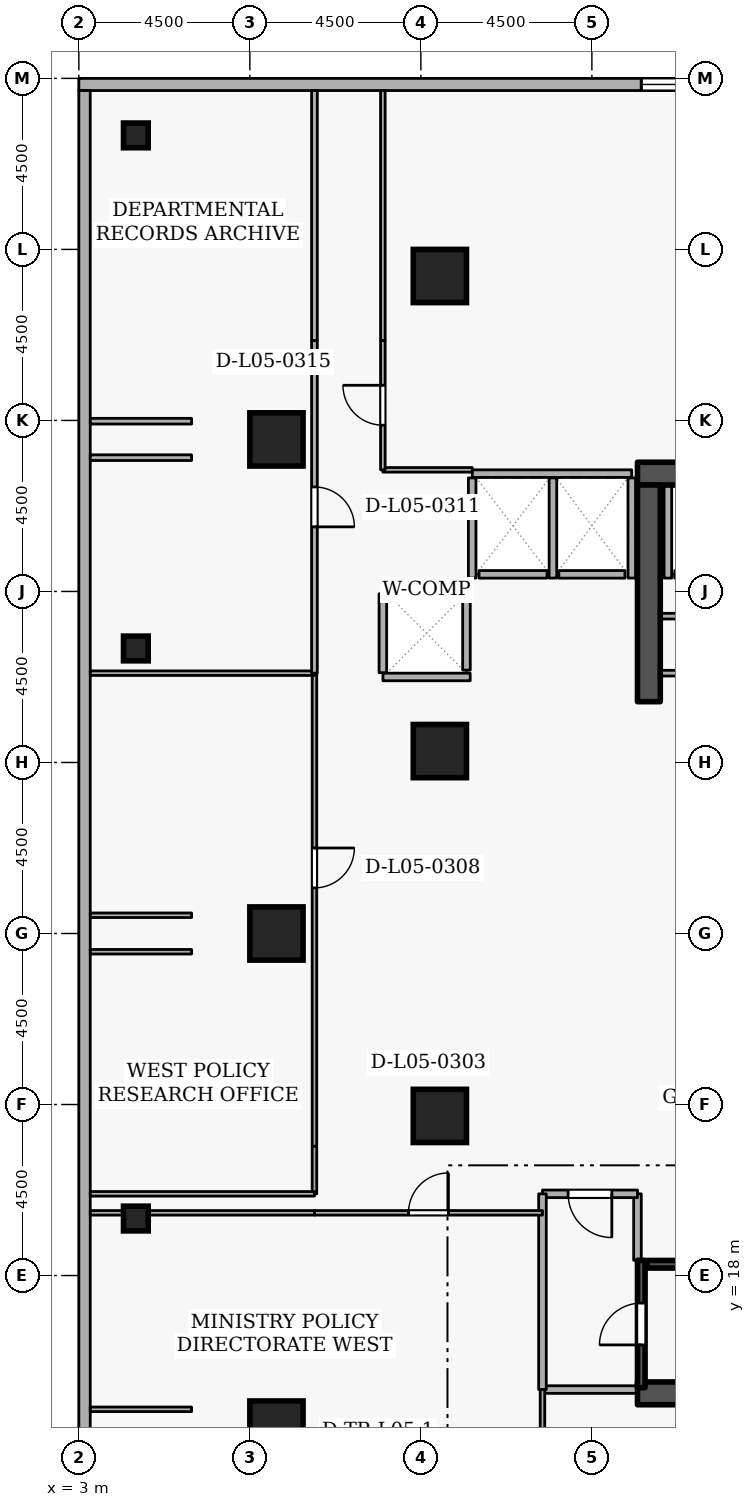
"""IFC4 building model, lengths in metres.
Left out: names, types, materials, properties, quantities, classifications, styles, units other than length and angle.
Written with IfcOpenShell. Run it as: python <this file> out.ifc"""

import sys

from ifc_helpers import new_model, si_unit, direction, frame, frame_2d, origin, origin_2d, place, context, subcontext, project, spatial, rectangle, extrude, element, fill, save


model = new_model("IFC4")
c1 = context("Model", 3, precision=1e-05, world=origin(), true_north=direction((0.0, 1.0)))
c2 = subcontext(c1, "Body", "Model", "MODEL_VIEW")
j1 = project(units=[si_unit("LENGTHUNIT", "METRE"), si_unit("PLANEANGLEUNIT", "RADIAN")], contexts=[c1])
p1 = place(None, origin())
s1 = spatial("IfcSite", under=j1, at=p1, CompositionType="ELEMENT")
p2 = place(p1, origin())
s2 = spatial("IfcBuilding", under=s1, at=p2, CompositionType="ELEMENT")
p3 = place(p2, frame((0.0, 0.0, 23.1)))
s3 = spatial("IfcBuildingStorey", under=s2, at=p3, CompositionType="ELEMENT", Elevation=23.1)
for number, where, z_axis, x_axis in (
    (1, (17.7, 14.9, 0.0), (0.0, 0.0, 1.0), (1.0, 0.0, 0.0)),
    (2, (17.7, 39.1, 0.0), (0.0, 0.0, 1.0), (1.0, 0.0, 0.0)),
):
    element("IfcWall", number, at=place(p3, frame(where, z_axis=z_axis, x_axis=x_axis)), inside=s3, PredefinedType="SHEAR", context=c2, shape_type="SweptSolid", body=[
        extrude(rectangle(XDim=15.6, YDim=0.6, at=frame_2d((7.8, 0.0))), origin(), (0.0, 0.0, 1.0), 4.8),
    ])
p4 = place(p3, frame((18.0, 33.1, 0.0), z_axis=(0.0, 0.0, 1.0), x_axis=(0.0, 1.0, 0.0)))
e3 = element("IfcWall", 3, at=p4, inside=s3, PredefinedType="SHEAR", context=c2, shape_type="SweptSolid", body=[
    extrude(rectangle(XDim=5.7, YDim=0.6, at=frame_2d((2.85, 0.0))), origin(), (0.0, 0.0, 1.0), 4.8),
])
for number, where, z_axis, x_axis in (
    (4, (12.5, 44.3, 0.0), (0.0, 0.0, 1.0), (1.0, 0.0, 0.0)),
    (5, (8.2, 14.0, 0.0), (0.0, 0.0, 1.0), (1.0, 0.0, 0.0)),
    (6, (8.2, 27.0, 0.0), (0.0, 0.0, 1.0), (1.0, 0.0, 0.0)),
    (7, (8.2, 40.0, 0.0), (0.0, 0.0, 1.0), (1.0, 0.0, 0.0)),
    (8, (12.5, 22.2, 0.0), (0.0, 0.0, 1.0), (1.0, 0.0, 0.0)),
    (9, (12.5, 31.8, 0.0), (0.0, 0.0, 1.0), (1.0, 0.0, 0.0)),
):
    element("IfcColumn", number, at=place(p3, frame(where, z_axis=z_axis, x_axis=x_axis)), inside=s3, PredefinedType="COLUMN", context=c2, shape_type="SweptSolid", body=[
        extrude(rectangle(XDim=1.4, YDim=1.4, at=origin_2d()), origin(), (0.0, 0.0, 1.0), 4.8),
    ])
for number, where, z_axis, x_axis in (
    (10, (4.5, 19.5, 0.0), (0.0, 0.0, 1.0), (1.0, 0.0, 0.0)),
    (11, (4.5, 34.5, 0.0), (0.0, 0.0, 1.0), (1.0, 0.0, 0.0)),
    (12, (4.5, 48.0, 0.0), (0.0, 0.0, 1.0), (1.0, 0.0, 0.0)),
):
    element("IfcColumn", number, at=place(p3, frame(where, z_axis=z_axis, x_axis=x_axis)), inside=s3, PredefinedType="COLUMN", context=c2, shape_type="SweptSolid", body=[
        extrude(rectangle(XDim=0.65, YDim=0.65, at=origin_2d()), origin(), (0.0, 0.0, 1.0), 4.8),
    ])
p5 = place(p3, frame((42.4, 49.34, 0.0), z_axis=(0.0, 0.0, 1.0), x_axis=(-1.0, 0.0, 0.0)))
e13 = element("IfcWall", 13, at=p5, inside=s3, PredefinedType="STANDARD", context=c2, shape_type="SweptSolid", body=[
    extrude(rectangle(XDim=39.4, YDim=0.32, at=frame_2d((19.7, 0.0))), origin(), (0.0, 0.0, 1.0), 2.84),
])
p6 = place(p5, frame((12.8, 0.0, 0.65)))
e14 = element("IfcOpeningElement", 14, at=p6, cuts=e13, PredefinedType="OPENING", context=c2, shape_type="SweptSolid", body=[
    extrude(rectangle(XDim=1.8, YDim=1.25, at=frame_2d((0.9, 0.625))), frame((0.0, 0.17, 0.0), z_axis=(0.0, -1.0, 0.0), x_axis=(1.0, 0.0, 0.0)), (0.0, 0.0, 1.0), 0.34),
])
p7 = place(p5, frame((22.8, 0.0, 0.65)))
e15 = element("IfcOpeningElement", 15, at=p7, cuts=e13, PredefinedType="OPENING", context=c2, shape_type="SweptSolid", body=[
    extrude(rectangle(XDim=1.8, YDim=1.25, at=frame_2d((0.9, 0.625))), frame((0.0, 0.17, 0.0), z_axis=(0.0, -1.0, 0.0), x_axis=(1.0, 0.0, 0.0)), (0.0, 0.0, 1.0), 0.34),
])
p8 = place(p3, frame((3.15, 49.18, 0.0), z_axis=(0.0, 0.0, 1.0), x_axis=(0.0, -1.0, 0.0)))
e16 = element("IfcWall", 16, at=p8, inside=s3, PredefinedType="STANDARD", context=c2, shape_type="SweptSolid", body=[
    extrude(rectangle(XDim=36.86, YDim=0.3, at=frame_2d((18.43, 0.0))), origin(), (0.0, 0.0, 1.0), 2.84),
])
p9 = place(p3, frame((20.62, 36.45, 0.0), z_axis=(0.0, 0.0, 1.0), x_axis=(-1.0, 0.0, 0.0)))
e17 = element("IfcWall", 17, at=p9, inside=s3, PredefinedType="STANDARD", context=c2, shape_type="SweptSolid", body=[
    extrude(rectangle(XDim=1.94, YDim=0.2, at=frame_2d((0.97, 0.0))), origin(), (0.0, 0.0, 1.0), 4.54),
])
p10 = place(p3, frame((17.37, 36.45, 0.0), z_axis=(0.0, 0.0, 1.0), x_axis=(-1.0, 0.0, 0.0)))
e18 = element("IfcWall", 18, at=p10, inside=s3, PredefinedType="STANDARD", context=c2, shape_type="SweptSolid", body=[
    extrude(rectangle(XDim=1.74, YDim=0.2, at=frame_2d((0.87, 0.0))), origin(), (0.0, 0.0, 1.0), 4.54),
])
p11 = place(p3, frame((15.32, 36.45, 0.0), z_axis=(0.0, 0.0, 1.0), x_axis=(-1.0, 0.0, 0.0)))
e19 = element("IfcWall", 19, at=p11, inside=s3, PredefinedType="STANDARD", context=c2, shape_type="SweptSolid", body=[
    extrude(rectangle(XDim=1.79, YDim=0.2, at=frame_2d((0.895, 0.0))), origin(), (0.0, 0.0, 1.0), 4.54),
])
p12 = place(p3, frame((13.2, 33.93, 0.0), z_axis=(0.0, 0.0, 1.0), x_axis=(0.0, 1.0, 0.0)))
e20 = element("IfcWall", 20, at=p12, inside=s3, PredefinedType="STANDARD", context=c2, shape_type="SweptSolid", body=[
    extrude(rectangle(XDim=1.94, YDim=0.2, at=frame_2d((0.97, 0.0))), origin(), (0.0, 0.0, 1.0), 4.54),
])
p13 = place(p3, frame((18.5, 36.352, 0.0), z_axis=(0.0, 0.0, 1.0), x_axis=(0.0, 1.0, 0.0)))
e21 = element("IfcWall", 21, at=p13, inside=s3, PredefinedType="STANDARD", context=c2, shape_type="SweptSolid", body=[
    extrude(rectangle(XDim=2.436, YDim=0.2, at=frame_2d((1.218, 0.0))), origin(), (0.0, 0.0, 1.0), 4.54),
])
p14 = place(p3, frame((13.352, 39.1, 0.0), z_axis=(0.0, 0.0, 1.0), x_axis=(1.0, 0.0, 0.0)))
e22 = element("IfcWall", 22, at=p14, inside=s3, PredefinedType="STANDARD", context=c2, shape_type="SweptSolid", body=[
    extrude(rectangle(XDim=4.196, YDim=0.2, at=frame_2d((2.098, 0.0))), origin(), (0.0, 0.0, 1.0), 4.54),
])
p15 = place(p3, frame((17.55, 36.352, 0.0), z_axis=(0.0, 0.0, 1.0), x_axis=(0.0, 1.0, 0.0)))
e23 = element("IfcWall", 23, at=p15, inside=s3, PredefinedType="STANDARD", context=c2, shape_type="SweptSolid", body=[
    extrude(rectangle(XDim=2.636, YDim=0.2, at=frame_2d((1.318, 0.0))), origin(), (0.0, 0.0, 1.0), 3.745),
])
for number, where, z_axis, x_axis in (
    (24, (15.475, 36.352, 0.0), (0.0, 0.0, 1.0), (0.0, 1.0, 0.0)),
    (25, (13.35, 36.352, 0.0), (0.0, 0.0, 1.0), (0.0, 1.0, 0.0)),
):
    element("IfcWall", number, at=place(p3, frame(where, z_axis=z_axis, x_axis=x_axis)), inside=s3, PredefinedType="STANDARD", context=c2, shape_type="SweptSolid", body=[
        extrude(rectangle(XDim=2.636, YDim=0.2, at=frame_2d((1.318, 0.0))), origin(), (0.0, 0.0, 1.0), 4.54),
    ])
for number, where, z_axis, x_axis in (
    (26, (11.002, 36.05, 0.0), (0.0, 0.0, 1.0), (1.0, 0.0, 0.0)),
    (27, (11.002, 33.75, 0.0), (0.0, 0.0, 1.0), (1.0, 0.0, 0.0)),
):
    element("IfcWall", number, at=place(p3, frame(where, z_axis=z_axis, x_axis=x_axis)), inside=s3, PredefinedType="STANDARD", context=c2, shape_type="SweptSolid", body=[
        extrude(rectangle(XDim=2.296, YDim=0.2, at=frame_2d((1.148, 0.0))), origin(), (0.0, 0.0, 1.0), 4.54),
    ])
p16 = place(p3, frame((11.0, 33.862, 0.0), z_axis=(0.0, 0.0, 1.0), x_axis=(0.0, 1.0, 0.0)))
e28 = element("IfcWall", 28, at=p16, inside=s3, PredefinedType="STANDARD", context=c2, shape_type="SweptSolid", body=[
    extrude(rectangle(XDim=2.076, YDim=0.2, at=frame_2d((1.038, 0.0))), origin(), (0.0, 0.0, 1.0), 4.54),
])
p17 = place(p3, frame((17.8, 15.05, 0.0), z_axis=(0.0, 0.0, 1.0), x_axis=(0.0, 1.0, 0.0)))
e29 = element("IfcWall", 29, at=p17, inside=s3, PredefinedType="SHEAR", context=c2, shape_type="SweptSolid", body=[
    extrude(rectangle(XDim=3.35, YDim=0.2, at=frame_2d((1.675, 0.0))), origin(), (0.0, 0.0, 1.0), 4.8),
])
p18 = place(p17, frame((1.125, 0.0, 0.0)))
e30 = element("IfcOpeningElement", 30, at=p18, cuts=e29, PredefinedType="OPENING", context=c2, shape_type="SweptSolid", body=[
    extrude(rectangle(XDim=1.1, YDim=2.1, at=frame_2d((0.55, 1.05))), frame((0.0, 0.11, 0.0), z_axis=(0.0, -1.0, 0.0), x_axis=(1.0, 0.0, 0.0)), (0.0, 0.0, 1.0), 0.22),
])
p19 = place(p3, frame((25.05, 18.297, 0.0), z_axis=(0.0, 0.0, 1.0), x_axis=(-1.0, 0.0, 0.0)))
e31 = element("IfcWall", 31, at=p19, inside=s3, PredefinedType="SHEAR", context=c2, shape_type="SweptSolid", body=[
    extrude(rectangle(XDim=7.1, YDim=0.2, at=frame_2d((3.55, 0.0))), origin(), (0.0, 0.0, 1.0), 4.8),
])
p20 = place(p3, frame((15.2, 15.0, 0.0), z_axis=(0.0, 0.0, 1.0), x_axis=(1.0, 0.0, 0.0)))
e32 = element("IfcWall", 32, at=p20, inside=s3, PredefinedType="STANDARD", context=c2, shape_type="SweptSolid", body=[
    extrude(rectangle(XDim=2.5, YDim=0.2, at=frame_2d((1.25, 0.0))), origin(), (0.0, 0.0, 1.0), 4.54),
])
p21 = place(p3, frame((17.7, 18.4, 0.0), z_axis=(0.0, 0.0, 1.0), x_axis=(0.0, 1.0, 0.0)))
e33 = element("IfcWall", 33, at=p21, inside=s3, PredefinedType="STANDARD", context=c2, shape_type="SweptSolid", body=[
    extrude(rectangle(XDim=1.75, YDim=0.2, at=frame_2d((0.875, 0.0))), origin(), (0.0, 0.0, 1.0), 3.745),
])
p22 = place(p3, frame((17.7, 20.15, 0.0), z_axis=(0.0, 0.0, 1.0), x_axis=(-1.0, 0.0, 0.0)))
e34 = element("IfcWall", 34, at=p22, inside=s3, PredefinedType="STANDARD", context=c2, shape_type="SweptSolid", body=[
    extrude(rectangle(XDim=2.5, YDim=0.2, at=frame_2d((1.25, 0.0))), origin(), (0.0, 0.0, 1.0), 4.54),
])
p23 = place(p22, frame((0.675, 0.0, 0.0)))
e35 = element("IfcOpeningElement", 35, at=p23, cuts=e34, PredefinedType="OPENING", context=c2, shape_type="SweptSolid", body=[
    extrude(rectangle(XDim=1.15, YDim=2.1, at=frame_2d((0.575, 1.05))), frame((0.0, 0.11, 0.0), z_axis=(0.0, -1.0, 0.0), x_axis=(1.0, 0.0, 0.0)), (0.0, 0.0, 1.0), 0.22),
])
p24 = place(p3, frame((15.2, 20.15, 0.0), z_axis=(0.0, 0.0, 1.0), x_axis=(0.0, -1.0, 0.0)))
e36 = element("IfcWall", 36, at=p24, inside=s3, PredefinedType="STANDARD", context=c2, shape_type="SweptSolid", body=[
    extrude(rectangle(XDim=5.15, YDim=0.2, at=frame_2d((2.575, 0.0))), origin(), (0.0, 0.0, 1.0), 4.54),
])
p25 = place(p3, frame((18.3, 33.85, 0.0), z_axis=(0.0, 0.0, 1.0), x_axis=(1.0, 0.0, 0.0)))
e37 = element("IfcWall", 37, at=p25, inside=s3, PredefinedType="PARTITIONING", context=c2, shape_type="SweptSolid", body=[
    extrude(rectangle(XDim=2.25, YDim=0.15, at=frame_2d((1.125, 0.0))), origin(), (0.0, 0.0, 1.0), 4.54),
])
p26 = place(p25, frame((0.665, 0.0, 0.0)))
e38 = element("IfcOpeningElement", 38, at=p26, cuts=e37, PredefinedType="OPENING", context=c2, shape_type="SweptSolid", body=[
    extrude(rectangle(XDim=0.92, YDim=2.08, at=frame_2d((0.46, 1.04))), frame((0.0, 0.085, 0.0), z_axis=(0.0, -1.0, 0.0), x_axis=(1.0, 0.0, 0.0)), (0.0, 0.0, 1.0), 0.17),
])
p27 = place(p3, frame((20.55, 35.35, 0.0), z_axis=(0.0, 0.0, 1.0), x_axis=(-1.0, 0.0, 0.0)))
e39 = element("IfcWall", 39, at=p27, inside=s3, PredefinedType="PARTITIONING", context=c2, shape_type="SweptSolid", body=[
    extrude(rectangle(XDim=2.25, YDim=0.15, at=frame_2d((1.125, 0.0))), origin(), (0.0, 0.0, 1.0), 4.54),
])
p28 = place(p3, frame((9.2, 19.65, 0.0), z_axis=(0.0, 0.0, 1.0), x_axis=(1.0, 0.0, 0.0)))
e40 = element("IfcWall", 40, at=p28, inside=s3, PredefinedType="PARTITIONING", context=c2, shape_type="SweptSolid", body=[
    extrude(rectangle(XDim=6.0, YDim=0.12, at=frame_2d((3.0, 0.0))), origin(), (0.0, 0.0, 1.0), 4.54),
])
p29 = place(p28, frame((2.475, 0.0, 0.0)))
e41 = element("IfcOpeningElement", 41, at=p29, cuts=e40, PredefinedType="OPENING", context=c2, shape_type="SweptSolid", body=[
    extrude(rectangle(XDim=1.05, YDim=2.1, at=frame_2d((0.525, 1.05))), frame((0.0, 0.07, 0.0), z_axis=(0.0, -1.0, 0.0), x_axis=(1.0, 0.0, 0.0)), (0.0, 0.0, 1.0), 0.14),
])
p30 = place(p3, frame((15.2, 15.0, 0.0), z_axis=(0.0, 0.0, 1.0), x_axis=(0.0, -1.0, 0.0)))
e42 = element("IfcWall", 42, at=p30, inside=s3, PredefinedType="PARTITIONING", context=c2, shape_type="SweptSolid", body=[
    extrude(rectangle(XDim=2.68, YDim=0.12, at=frame_2d((1.34, 0.0))), origin(), (0.0, 0.0, 1.0), 4.54),
])
p31 = place(p3, frame((5.966, 14.48, 0.0), z_axis=(0.0, 0.0, 1.0), x_axis=(-1.0, 0.0, 0.0)))
e43 = element("IfcWall", 43, at=p31, inside=s3, PredefinedType="PARTITIONING", context=c2, shape_type="SweptSolid", body=[
    extrude(rectangle(XDim=2.666, YDim=0.12, at=frame_2d((1.333, 0.0))), origin(), (0.0, 0.0, 1.0), 2.885),
])
p32 = place(p3, frame((3.3, 19.65, 0.0), z_axis=(0.0, 0.0, 1.0), x_axis=(1.0, 0.0, 0.0)))
e44 = element("IfcWall", 44, at=p32, inside=s3, PredefinedType="PARTITIONING", context=c2, shape_type="SweptSolid", body=[
    extrude(rectangle(XDim=5.9, YDim=0.12, at=frame_2d((2.95, 0.0))), origin(), (0.0, 0.0, 1.0), 4.54),
])
p33 = place(p3, frame((9.2, 33.85, 0.0), z_axis=(0.0, 0.0, 1.0), x_axis=(0.0, -1.0, 0.0)))
e45 = element("IfcWall", 45, at=p33, inside=s3, PredefinedType="PARTITIONING", context=c2, shape_type="SweptSolid", body=[
    extrude(rectangle(XDim=12.45, YDim=0.12, at=frame_2d((6.225, 0.0))), origin(), (0.0, 0.0, 1.0), 4.54),
])
p34 = place(p33, frame((4.6, 0.0, 0.0)))
e46 = element("IfcOpeningElement", 46, at=p34, cuts=e45, PredefinedType="OPENING", context=c2, shape_type="SweptSolid", body=[
    extrude(rectangle(XDim=1.05, YDim=2.1, at=frame_2d((0.525, 1.05))), frame((0.0, 0.07, 0.0), z_axis=(0.0, -1.0, 0.0), x_axis=(1.0, 0.0, 0.0)), (0.0, 0.0, 1.0), 0.14),
])
p35 = place(p3, frame((9.2, 21.4, 0.0), z_axis=(0.0, 0.0, 1.0), x_axis=(0.0, -1.0, 0.0)))
e47 = element("IfcWall", 47, at=p35, inside=s3, PredefinedType="PARTITIONING", context=c2, shape_type="SweptSolid", body=[
    extrude(rectangle(XDim=1.25, YDim=0.12, at=frame_2d((0.625, 0.0))), origin(), (0.0, 0.0, 1.0), 4.54),
])
p36 = place(p3, frame((9.2, 20.15, 0.0), z_axis=(0.0, 0.0, 1.0), x_axis=(-1.0, 0.0, 0.0)))
e48 = element("IfcWall", 48, at=p36, inside=s3, PredefinedType="PARTITIONING", context=c2, shape_type="SweptSolid", body=[
    extrude(rectangle(XDim=5.9, YDim=0.12, at=frame_2d((2.95, 0.0))), origin(), (0.0, 0.0, 1.0), 4.54),
])
for number, where, z_axis, x_axis in (
    (49, (3.3, 26.52, 0.0), (0.0, 0.0, 1.0), (1.0, 0.0, 0.0)),
    (50, (5.966, 27.48, 0.0), (0.0, 0.0, 1.0), (-1.0, 0.0, 0.0)),
):
    element("IfcWall", number, at=place(p3, frame(where, z_axis=z_axis, x_axis=x_axis)), inside=s3, PredefinedType="PARTITIONING", context=c2, shape_type="SweptSolid", body=[
        extrude(rectangle(XDim=2.666, YDim=0.12, at=frame_2d((1.333, 0.0))), origin(), (0.0, 0.0, 1.0), 2.885),
    ])
p37 = place(p3, frame((3.3, 33.85, 0.0), z_axis=(0.0, 0.0, 1.0), x_axis=(1.0, 0.0, 0.0)))
e51 = element("IfcWall", 51, at=p37, inside=s3, PredefinedType="PARTITIONING", context=c2, shape_type="SweptSolid", body=[
    extrude(rectangle(XDim=5.9, YDim=0.12, at=frame_2d((2.95, 0.0))), origin(), (0.0, 0.0, 1.0), 4.54),
])
p38 = place(p3, frame((9.2, 49.18, 0.0), z_axis=(0.0, 0.0, 1.0), x_axis=(0.0, -1.0, 0.0)))
e52 = element("IfcWall", 52, at=p38, inside=s3, PredefinedType="PARTITIONING", context=c2, shape_type="SweptSolid", body=[
    extrude(rectangle(XDim=6.58, YDim=0.15, at=frame_2d((3.29, 0.0))), origin(), (0.0, 0.0, 1.0), 4.54),
])
p39 = place(p3, frame((9.2, 42.6, 0.0), z_axis=(0.0, 0.0, 1.0), x_axis=(0.0, -1.0, 0.0)))
e53 = element("IfcWall", 53, at=p39, inside=s3, PredefinedType="PARTITIONING", context=c2, shape_type="SweptSolid", body=[
    extrude(rectangle(XDim=8.75, YDim=0.15, at=frame_2d((4.375, 0.0))), origin(), (0.0, 0.0, 1.0), 4.54),
])
p40 = place(p39, frame((3.85, 0.0, 0.0)))
e54 = element("IfcOpeningElement", 54, at=p40, cuts=e53, PredefinedType="OPENING", context=c2, shape_type="SweptSolid", body=[
    extrude(rectangle(XDim=1.05, YDim=2.1, at=frame_2d((0.525, 1.05))), frame((0.0, 0.085, 0.0), z_axis=(0.0, -1.0, 0.0), x_axis=(1.0, 0.0, 0.0)), (0.0, 0.0, 1.0), 0.17),
])
for number, where, z_axis, x_axis in (
    (55, (3.3, 39.52, 0.0), (0.0, 0.0, 1.0), (1.0, 0.0, 0.0)),
    (56, (5.966, 40.48, 0.0), (0.0, 0.0, 1.0), (-1.0, 0.0, 0.0)),
):
    element("IfcWall", number, at=place(p3, frame(where, z_axis=z_axis, x_axis=x_axis)), inside=s3, PredefinedType="PARTITIONING", context=c2, shape_type="SweptSolid", body=[
        extrude(rectangle(XDim=2.666, YDim=0.15, at=frame_2d((1.333, 0.0))), origin(), (0.0, 0.0, 1.0), 2.885),
    ])
p41 = place(p3, frame((11.0, 42.6, 0.0), z_axis=(0.0, 0.0, 1.0), x_axis=(0.0, 1.0, 0.0)))
e57 = element("IfcWall", 57, at=p41, inside=s3, PredefinedType="PARTITIONING", context=c2, shape_type="SweptSolid", body=[
    extrude(rectangle(XDim=6.58, YDim=0.12, at=frame_2d((3.29, 0.0))), origin(), (0.0, 0.0, 1.0), 4.54),
])
p42 = place(p3, frame((13.352, 39.2, 0.0), z_axis=(0.0, 0.0, 1.0), x_axis=(-1.0, 0.0, 0.0)))
e58 = element("IfcWall", 58, at=p42, inside=s3, PredefinedType="PARTITIONING", context=c2, shape_type="SweptSolid", body=[
    extrude(rectangle(XDim=2.352, YDim=0.12, at=frame_2d((1.176, 0.0))), origin(), (0.0, 0.0, 1.0), 4.54),
])
p43 = place(p3, frame((11.0, 39.2, 0.0), z_axis=(0.0, 0.0, 1.0), x_axis=(0.0, 1.0, 0.0)))
e59 = element("IfcWall", 59, at=p43, inside=s3, PredefinedType="PARTITIONING", context=c2, shape_type="SweptSolid", body=[
    extrude(rectangle(XDim=3.4, YDim=0.12, at=frame_2d((1.7, 0.0))), origin(), (0.0, 0.0, 1.0), 4.54),
])
p44 = place(p43, frame((1.175, 0.0, 0.0)))
e60 = element("IfcOpeningElement", 60, at=p44, cuts=e59, PredefinedType="OPENING", context=c2, shape_type="SweptSolid", body=[
    extrude(rectangle(XDim=1.05, YDim=2.1, at=frame_2d((0.525, 1.05))), frame((0.0, 0.07, 0.0), z_axis=(0.0, -1.0, 0.0), x_axis=(1.0, 0.0, 0.0)), (0.0, 0.0, 1.0), 0.14),
])
p45 = place(p7, origin())
e61 = element("IfcWindow", 61, at=p45, inside=s3, PartitioningType="SINGLE_PANEL", PredefinedType="WINDOW", context=c2, shape_type="SweptSolid", body=[
    extrude(rectangle(XDim=1.8, YDim=1.25, at=frame_2d((0.9, 0.625))), frame((0.0, 0.03, 0.0), z_axis=(0.0, -1.0, 0.0), x_axis=(1.0, 0.0, 0.0)), (0.0, 0.0, 1.0), 0.06),
])
fill(e15, e61)
p46 = place(p18, origin())
e62 = element("IfcDoor", 62, at=p46, inside=s3, OperationType="SINGLE_SWING_LEFT", PredefinedType="DOOR", context=c2, shape_type="SweptSolid", body=[
    extrude(rectangle(XDim=1.1, YDim=2.1, at=frame_2d((0.55, 1.05))), frame((0.0, 0.025, 0.0), z_axis=(0.0, -1.0, 0.0), x_axis=(1.0, 0.0, 0.0)), (0.0, 0.0, 1.0), 0.05),
])
fill(e30, e62)
p47 = place(p23, origin())
e63 = element("IfcDoor", 63, at=p47, inside=s3, OperationType="SINGLE_SWING_LEFT", PredefinedType="DOOR", context=c2, shape_type="SweptSolid", body=[
    extrude(rectangle(XDim=1.15, YDim=2.1, at=frame_2d((0.575, 1.05))), frame((0.0, 0.025, 0.0), z_axis=(0.0, -1.0, 0.0), x_axis=(1.0, 0.0, 0.0)), (0.0, 0.0, 1.0), 0.05),
])
fill(e35, e63)
p48 = place(p29, origin())
e64 = element("IfcDoor", 64, at=p48, inside=s3, OperationType="SINGLE_SWING_RIGHT", PredefinedType="DOOR", context=c2, shape_type="SweptSolid", body=[
    extrude(rectangle(XDim=1.05, YDim=2.1, at=frame_2d((0.525, 1.05))), frame((0.0, 0.025, 0.0), z_axis=(0.0, -1.0, 0.0), x_axis=(1.0, 0.0, 0.0)), (0.0, 0.0, 1.0), 0.05),
])
fill(e41, e64)
p49 = place(p34, origin())
e65 = element("IfcDoor", 65, at=p49, inside=s3, OperationType="SINGLE_SWING_LEFT", PredefinedType="DOOR", context=c2, shape_type="SweptSolid", body=[
    extrude(rectangle(XDim=1.05, YDim=2.1, at=frame_2d((0.525, 1.05))), frame((0.0, 0.025, 0.0), z_axis=(0.0, -1.0, 0.0), x_axis=(1.0, 0.0, 0.0)), (0.0, 0.0, 1.0), 0.05),
])
fill(e46, e65)
p50 = place(p40, origin())
e66 = element("IfcDoor", 66, at=p50, inside=s3, OperationType="SINGLE_SWING_RIGHT", PredefinedType="DOOR", context=c2, shape_type="SweptSolid", body=[
    extrude(rectangle(XDim=1.05, YDim=2.1, at=frame_2d((0.525, 1.05))), frame((0.0, 0.025, 0.0), z_axis=(0.0, -1.0, 0.0), x_axis=(1.0, 0.0, 0.0)), (0.0, 0.0, 1.0), 0.05),
])
fill(e54, e66)
p51 = place(p44, origin())
e67 = element("IfcDoor", 67, at=p51, inside=s3, OperationType="SINGLE_SWING_RIGHT", PredefinedType="DOOR", context=c2, shape_type="SweptSolid", body=[
    extrude(rectangle(XDim=1.05, YDim=2.1, at=frame_2d((0.525, 1.05))), frame((0.0, 0.025, 0.0), z_axis=(0.0, -1.0, 0.0), x_axis=(1.0, 0.0, 0.0)), (0.0, 0.0, 1.0), 0.05),
])
fill(e60, e67)
save(model, sys.argv[1])
